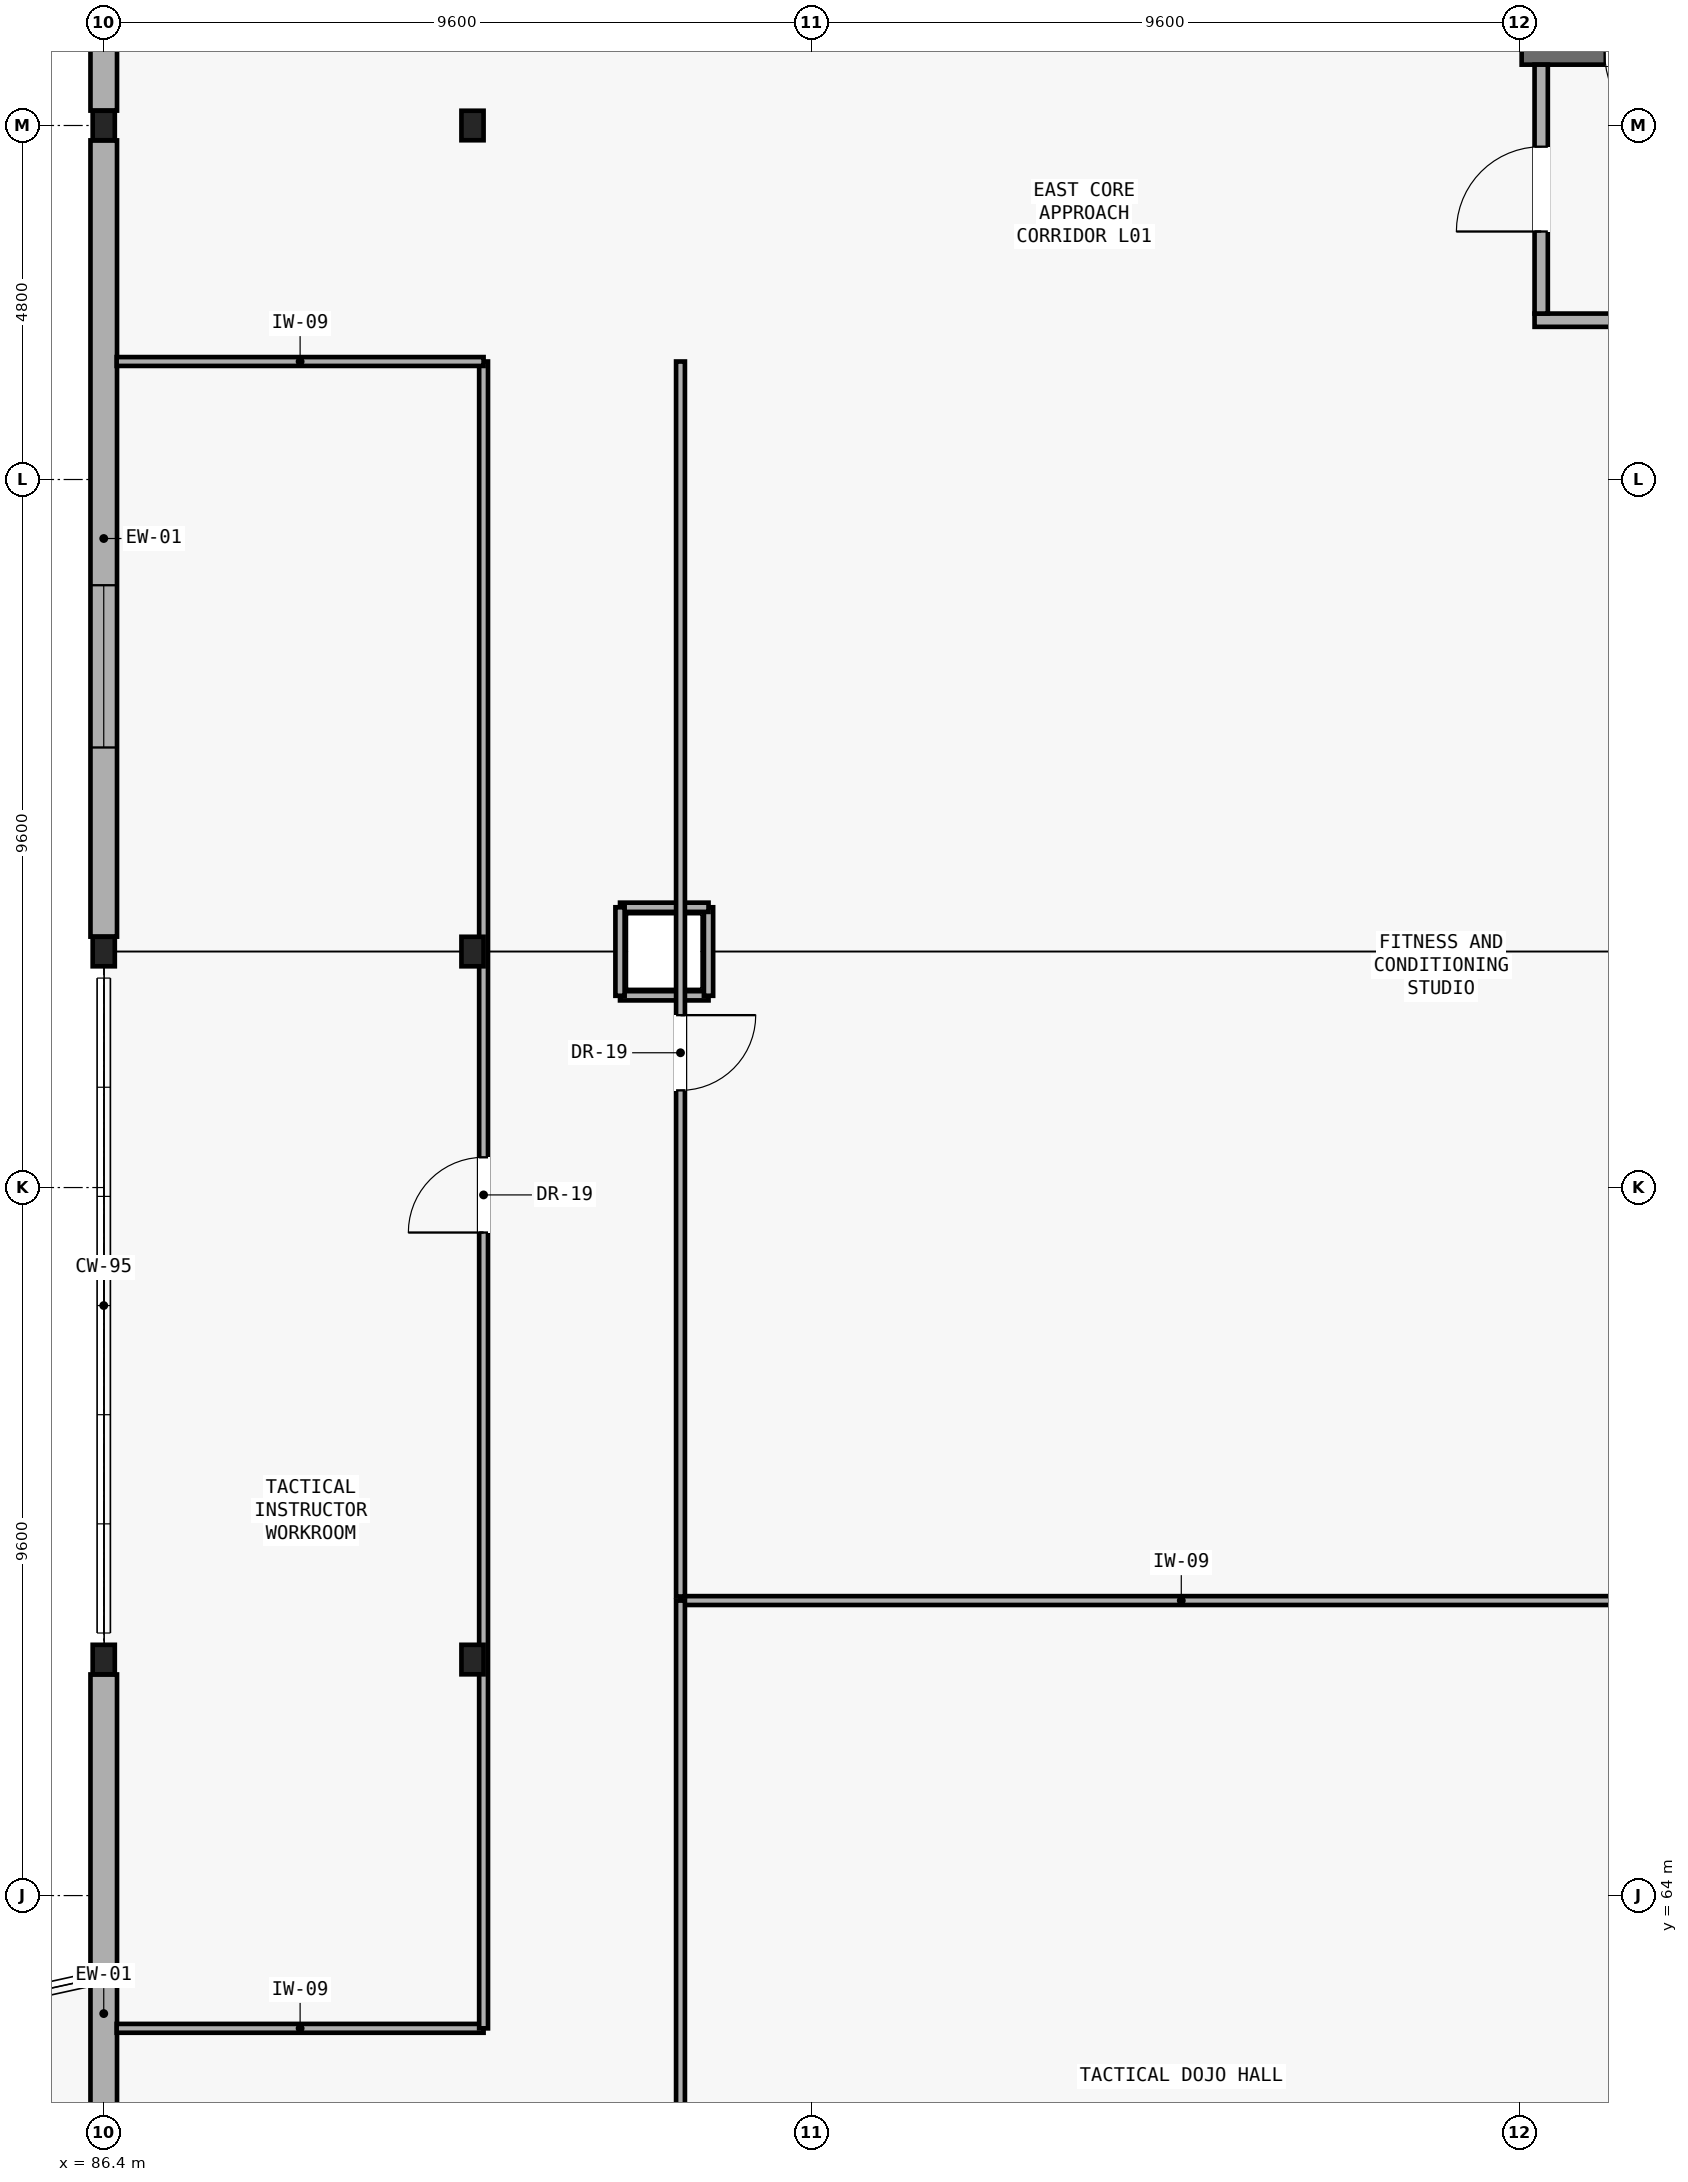
"""IFC4 building model, lengths in metres.
Left out: names, types, materials, properties, quantities, classifications, styles, units other than length and angle.
Written with IfcOpenShell. Run it as: python <this file> out.ifc"""

import sys

from ifc_helpers import new_model, si_unit, direction, frame, frame_2d, origin, origin_2d, place, context, subcontext, project, spatial, rectangle, i_section, extrude, element, fill, save


model = new_model("IFC4")
c1 = context("Model", 3, precision=1e-05, world=origin(), true_north=direction((0.0, 1.0)))
c2 = subcontext(c1, "Body", "Model", "MODEL_VIEW")
j1 = project(units=[si_unit("LENGTHUNIT", "METRE"), si_unit("PLANEANGLEUNIT", "RADIAN")], contexts=[c1])
p1 = place(None, origin())
s1 = spatial("IfcSite", under=j1, at=p1, CompositionType="ELEMENT")
p2 = place(p1, origin())
s2 = spatial("IfcBuilding", under=s1, at=p2, CompositionType="ELEMENT")
p3 = place(p2, frame((0.0, 0.0, 5.25)))
s3 = spatial("IfcBuildingStorey", under=s2, at=p3, CompositionType="ELEMENT", Elevation=5.25)
for number, where, z_axis, x_axis in (
    (1, (86.4, 67.2, 0.0), (0.0, 0.0, 1.0), (1.0, 0.0, 0.0)),
    (2, (91.4, 67.2, 0.0), (0.0, 0.0, 1.0), (1.0, 0.0, 0.0)),
    (3, (86.4, 76.8, 0.0), (0.0, 0.0, 1.0), (1.0, 0.0, 0.0)),
    (4, (91.4, 76.8, 0.0), (0.0, 0.0, 1.0), (1.0, 0.0, 0.0)),
    (5, (86.4, 88.0, 0.0), (0.0, 0.0, 1.0), (1.0, 0.0, 0.0)),
    (6, (91.4, 88.0, 0.0), (0.0, 0.0, 1.0), (1.0, 0.0, 0.0)),
):
    element("IfcColumn", number, at=place(p3, frame(where, z_axis=z_axis, x_axis=x_axis)), inside=s3, PredefinedType="COLUMN", context=c2, shape_type="SweptSolid", body=[
        extrude(i_section(OverallWidth=0.3, OverallDepth=0.4, WebThickness=0.013, FlangeThickness=0.024, FilletRadius=0.027, at=origin_2d()), origin(), (0.0, 0.0, 1.0), 4.2),
    ])
p4 = place(p3, frame((86.4, 57.802, 0.0), z_axis=(0.0, 0.0, 1.0), x_axis=(0.0, 1.0, 0.0)))
e7 = element("IfcWall", 7, at=p4, inside=s3, PredefinedType="SOLIDWALL", context=c2, shape_type="SweptSolid", body=[
    extrude(rectangle(XDim=9.196, YDim=0.36, at=frame_2d((4.598, 0.0))), origin(), (0.0, 0.0, 1.0), 3.5),
])
p5 = place(p4, frame((1.798, 0.0, 0.0)))
e8 = element("IfcOpeningElement", 8, at=p5, cuts=e7, PredefinedType="OPENING", context=c2, shape_type="SweptSolid", body=[
    extrude(rectangle(XDim=1.5, YDim=2.2, at=frame_2d((0.75, 1.1))), frame((0.0, 0.19, 0.0), z_axis=(0.0, -1.0, 0.0), x_axis=(1.0, 0.0, 0.0)), (0.0, 0.0, 1.0), 0.38),
])
p6 = place(p3, frame((86.4, 77.002, 0.0), z_axis=(0.0, 0.0, 1.0), x_axis=(0.0, 1.0, 0.0)))
e9 = element("IfcWall", 9, at=p6, inside=s3, PredefinedType="SOLIDWALL", context=c2, shape_type="SweptSolid", body=[
    extrude(rectangle(XDim=10.796, YDim=0.36, at=frame_2d((5.398, 0.0))), origin(), (0.0, 0.0, 1.0), 3.5),
])
p7 = place(p6, frame((2.565, 0.0, 0.9)))
e10 = element("IfcOpeningElement", 10, at=p7, cuts=e9, PredefinedType="OPENING", context=c2, shape_type="SweptSolid", body=[
    extrude(rectangle(XDim=2.2, YDim=1.15, at=frame_2d((1.1, 0.575))), frame((0.0, 0.19, 0.0), z_axis=(0.0, -1.0, 0.0), x_axis=(1.0, 0.0, 0.0)), (0.0, 0.0, 1.0), 0.38),
])
p8 = place(p3, frame((86.4, 88.202, 0.0), z_axis=(0.0, 0.0, 1.0), x_axis=(0.0, 1.0, 0.0)))
e11 = element("IfcWall", 11, at=p8, inside=s3, PredefinedType="SOLIDWALL", context=c2, shape_type="SweptSolid", body=[
    extrude(rectangle(XDim=9.196, YDim=0.36, at=frame_2d((4.598, 0.0))), origin(), (0.0, 0.0, 1.0), 3.5),
])
p9 = place(p3, frame((105.625, 89.0, 0.0), z_axis=(0.0, 0.0, 1.0), x_axis=(1.0, 0.0, 0.0)))
e12 = element("IfcWall", 12, at=p9, inside=s3, PredefinedType="SHEAR", context=c2, shape_type="SweptSolid", body=[
    extrude(rectangle(XDim=3.9, YDim=0.35, at=frame_2d((1.95, 0.0))), origin(), (0.0, 0.0, 1.0), 3.96),
])
p10 = place(p9, frame((1.125, 0.0, 0.0)))
e13 = element("IfcOpeningElement", 13, at=p10, cuts=e12, PredefinedType="OPENING", context=c2, shape_type="SweptSolid", body=[
    extrude(rectangle(XDim=1.3, YDim=2.15, at=frame_2d((0.65, 1.075))), frame((0.0, 0.185, 0.0), z_axis=(0.0, -1.0, 0.0), x_axis=(1.0, 0.0, 0.0)), (0.0, 0.0, 1.0), 0.37),
])
p11 = place(p3, frame((105.8, 85.36, 0.0), z_axis=(0.0, 0.0, 1.0), x_axis=(1.0, 0.0, 0.0)))
e14 = element("IfcWall", 14, at=p11, inside=s3, PredefinedType="PARTITIONING", context=c2, shape_type="SweptSolid", body=[
    extrude(rectangle(XDim=8.55, YDim=0.18, at=frame_2d((4.275, 0.0))), origin(), (0.0, 0.0, 1.0), 3.96),
])
p12 = place(p3, frame((105.89, 85.45, 0.0), z_axis=(0.0, 0.0, 1.0), x_axis=(0.0, 1.0, 0.0)))
e15 = element("IfcWall", 15, at=p12, inside=s3, PredefinedType="PARTITIONING", context=c2, shape_type="SweptSolid", body=[
    extrude(rectangle(XDim=3.375, YDim=0.18, at=frame_2d((1.688, 0.0))), origin(), (0.0, 0.0, 1.0), 3.96),
])
p13 = place(p12, frame((1.113, 0.0, 0.0)))
e16 = element("IfcOpeningElement", 16, at=p13, cuts=e15, PredefinedType="OPENING", context=c2, shape_type="SweptSolid", body=[
    extrude(rectangle(XDim=1.15, YDim=2.15, at=frame_2d((0.575, 1.075))), frame((0.0, 0.1, 0.0), z_axis=(0.0, -1.0, 0.0), x_axis=(1.0, 0.0, 0.0)), (0.0, 0.0, 1.0), 0.2),
])
p14 = place(p3, frame((93.4, 76.2, 0.0), z_axis=(0.0, 0.0, 1.0), x_axis=(1.0, 0.0, 0.0)))
e17 = element("IfcWall", 17, at=p14, inside=s3, PredefinedType="PARTITIONING", context=c2, shape_type="SweptSolid", body=[
    extrude(rectangle(XDim=1.2, YDim=0.125, at=frame_2d((0.6, 0.0))), origin(), (0.0, 0.0, 1.0), 3.96),
])
p15 = place(p3, frame((94.6, 76.2, 0.0), z_axis=(0.0, 0.0, 1.0), x_axis=(0.0, 1.0, 0.0)))
e18 = element("IfcWall", 18, at=p15, inside=s3, PredefinedType="PARTITIONING", context=c2, shape_type="SweptSolid", body=[
    extrude(rectangle(XDim=1.2, YDim=0.125, at=frame_2d((0.6, 0.0))), origin(), (0.0, 0.0, 1.0), 3.96),
])
p16 = place(p3, frame((94.6, 77.4, 0.0), z_axis=(0.0, 0.0, 1.0), x_axis=(-1.0, 0.0, 0.0)))
e19 = element("IfcWall", 19, at=p16, inside=s3, PredefinedType="PARTITIONING", context=c2, shape_type="SweptSolid", body=[
    extrude(rectangle(XDim=1.2, YDim=0.125, at=frame_2d((0.6, 0.0))), origin(), (0.0, 0.0, 1.0), 3.96),
])
p17 = place(p3, frame((93.4, 77.4, 0.0), z_axis=(0.0, 0.0, 1.0), x_axis=(0.0, -1.0, 0.0)))
e20 = element("IfcWall", 20, at=p17, inside=s3, PredefinedType="PARTITIONING", context=c2, shape_type="SweptSolid", body=[
    extrude(rectangle(XDim=1.2, YDim=0.125, at=frame_2d((0.6, 0.0))), origin(), (0.0, 0.0, 1.0), 3.96),
])
p18 = place(p3, frame((86.575, 62.2, 0.0), z_axis=(0.0, 0.0, 1.0), x_axis=(1.0, 0.0, 0.0)))
e21 = element("IfcWall", 21, at=p18, inside=s3, PredefinedType="PARTITIONING", context=c2, shape_type="SweptSolid", body=[
    extrude(rectangle(XDim=4.975, YDim=0.12, at=frame_2d((2.488, 0.0))), origin(), (0.0, 0.0, 1.0), 3.96),
])
p19 = place(p3, frame((91.55, 62.2, 0.0), z_axis=(0.0, 0.0, 1.0), x_axis=(0.0, 1.0, 0.0)))
e22 = element("IfcWall", 22, at=p19, inside=s3, PredefinedType="PARTITIONING", context=c2, shape_type="SweptSolid", body=[
    extrude(rectangle(XDim=22.6, YDim=0.12, at=frame_2d((11.3, 0.0))), origin(), (0.0, 0.0, 1.0), 3.5),
])
p20 = place(p19, frame((10.79, 0.0, 0.0)))
e23 = element("IfcOpeningElement", 23, at=p20, cuts=e22, PredefinedType="OPENING", context=c2, shape_type="SweptSolid", body=[
    extrude(rectangle(XDim=1.02, YDim=2.1, at=frame_2d((0.51, 1.05))), frame((0.0, 0.07, 0.0), z_axis=(0.0, -1.0, 0.0), x_axis=(1.0, 0.0, 0.0)), (0.0, 0.0, 1.0), 0.14),
])
p21 = place(p3, frame((91.55, 84.8, 0.0), z_axis=(0.0, 0.0, 1.0), x_axis=(-1.0, 0.0, 0.0)))
e24 = element("IfcWall", 24, at=p21, inside=s3, PredefinedType="PARTITIONING", context=c2, shape_type="SweptSolid", body=[
    extrude(rectangle(XDim=4.975, YDim=0.12, at=frame_2d((2.488, 0.0))), origin(), (0.0, 0.0, 1.0), 3.96),
])
p22 = place(p3, frame((107.8, 68.0, 0.0), z_axis=(0.0, 0.0, 1.0), x_axis=(-1.0, 0.0, 0.0)))
e25 = element("IfcWall", 25, at=p22, inside=s3, PredefinedType="PARTITIONING", context=c2, shape_type="SweptSolid", body=[
    extrude(rectangle(XDim=13.58, YDim=0.12, at=frame_2d((6.79, 0.0))), origin(), (0.0, 0.0, 1.0), 3.96),
])
p23 = place(p3, frame((94.22, 68.0, 0.0), z_axis=(0.0, 0.0, 1.0), x_axis=(0.0, -1.0, 0.0)))
e26 = element("IfcWall", 26, at=p23, inside=s3, PredefinedType="PARTITIONING", context=c2, shape_type="SweptSolid", body=[
    extrude(rectangle(XDim=16.8, YDim=0.12, at=frame_2d((8.4, 0.0))), origin(), (0.0, 0.0, 1.0), 3.96),
])
p24 = place(p23, frame((7.91, 0.0, 0.0)))
e27 = element("IfcOpeningElement", 27, at=p24, cuts=e26, PredefinedType="OPENING", context=c2, shape_type="SweptSolid", body=[
    extrude(rectangle(XDim=0.98, YDim=2.1, at=frame_2d((0.49, 1.05))), frame((0.0, 0.07, 0.0), z_axis=(0.0, -1.0, 0.0), x_axis=(1.0, 0.0, 0.0)), (0.0, 0.0, 1.0), 0.14),
])
p25 = place(p3, frame((94.22, 84.8, 0.0), z_axis=(0.0, 0.0, 1.0), x_axis=(0.0, -1.0, 0.0)))
e28 = element("IfcWall", 28, at=p25, inside=s3, PredefinedType="PARTITIONING", context=c2, shape_type="SweptSolid", body=[
    extrude(rectangle(XDim=16.745, YDim=0.12, at=frame_2d((8.373, 0.0))), origin(), (0.0, 0.0, 1.0), 3.96),
])
p26 = place(p25, frame((8.863, 0.0, 0.0)))
e29 = element("IfcOpeningElement", 29, at=p26, cuts=e28, PredefinedType="OPENING", context=c2, shape_type="SweptSolid", body=[
    extrude(rectangle(XDim=1.02, YDim=2.1, at=frame_2d((0.51, 1.05))), frame((0.0, 0.07, 0.0), z_axis=(0.0, -1.0, 0.0), x_axis=(1.0, 0.0, 0.0)), (0.0, 0.0, 1.0), 0.14),
])
p27 = place(p7, origin())
e30 = element("IfcWindow", 30, at=p27, inside=s3, PartitioningType="SINGLE_PANEL", PredefinedType="WINDOW", context=c2, shape_type="SweptSolid", body=[
    extrude(rectangle(XDim=2.2, YDim=1.15, at=frame_2d((1.1, 0.575))), frame((0.0, 0.03, 0.0), z_axis=(0.0, -1.0, 0.0), x_axis=(1.0, 0.0, 0.0)), (0.0, 0.0, 1.0), 0.06),
])
fill(e10, e30)
p28 = place(p10, frame((1.3, 0.0, 0.0), z_axis=(0.0, 0.0, 1.0), x_axis=(-1.0, 0.0, 0.0)))
e31 = element("IfcDoor", 31, at=p28, inside=s3, OperationType="SINGLE_SWING_RIGHT", PredefinedType="DOOR", context=c2, shape_type="SweptSolid", body=[
    extrude(rectangle(XDim=1.3, YDim=2.15, at=frame_2d((0.65, 1.075))), frame((0.0, 0.025, 0.0), z_axis=(0.0, -1.0, 0.0), x_axis=(1.0, 0.0, 0.0)), (0.0, 0.0, 1.0), 0.05),
])
fill(e13, e31)
p29 = place(p13, origin())
e32 = element("IfcDoor", 32, at=p29, inside=s3, OperationType="SINGLE_SWING_LEFT", PredefinedType="DOOR", context=c2, shape_type="SweptSolid", body=[
    extrude(rectangle(XDim=1.15, YDim=2.15, at=frame_2d((0.575, 1.075))), frame((0.0, 0.025, 0.0), z_axis=(0.0, -1.0, 0.0), x_axis=(1.0, 0.0, 0.0)), (0.0, 0.0, 1.0), 0.05),
])
fill(e16, e32)
p30 = place(p20, origin())
e33 = element("IfcDoor", 33, at=p30, inside=s3, OperationType="SINGLE_SWING_LEFT", PredefinedType="DOOR", context=c2, shape_type="SweptSolid", body=[
    extrude(rectangle(XDim=1.02, YDim=2.1, at=frame_2d((0.51, 1.05))), frame((0.0, 0.025, 0.0), z_axis=(0.0, -1.0, 0.0), x_axis=(1.0, 0.0, 0.0)), (0.0, 0.0, 1.0), 0.05),
])
fill(e23, e33)
p31 = place(p26, origin())
e34 = element("IfcDoor", 34, at=p31, inside=s3, OperationType="SINGLE_SWING_LEFT", PredefinedType="DOOR", context=c2, shape_type="SweptSolid", body=[
    extrude(rectangle(XDim=1.02, YDim=2.1, at=frame_2d((0.51, 1.05))), frame((0.0, 0.025, 0.0), z_axis=(0.0, -1.0, 0.0), x_axis=(1.0, 0.0, 0.0)), (0.0, 0.0, 1.0), 0.05),
])
fill(e29, e34)
save(model, sys.argv[1])
